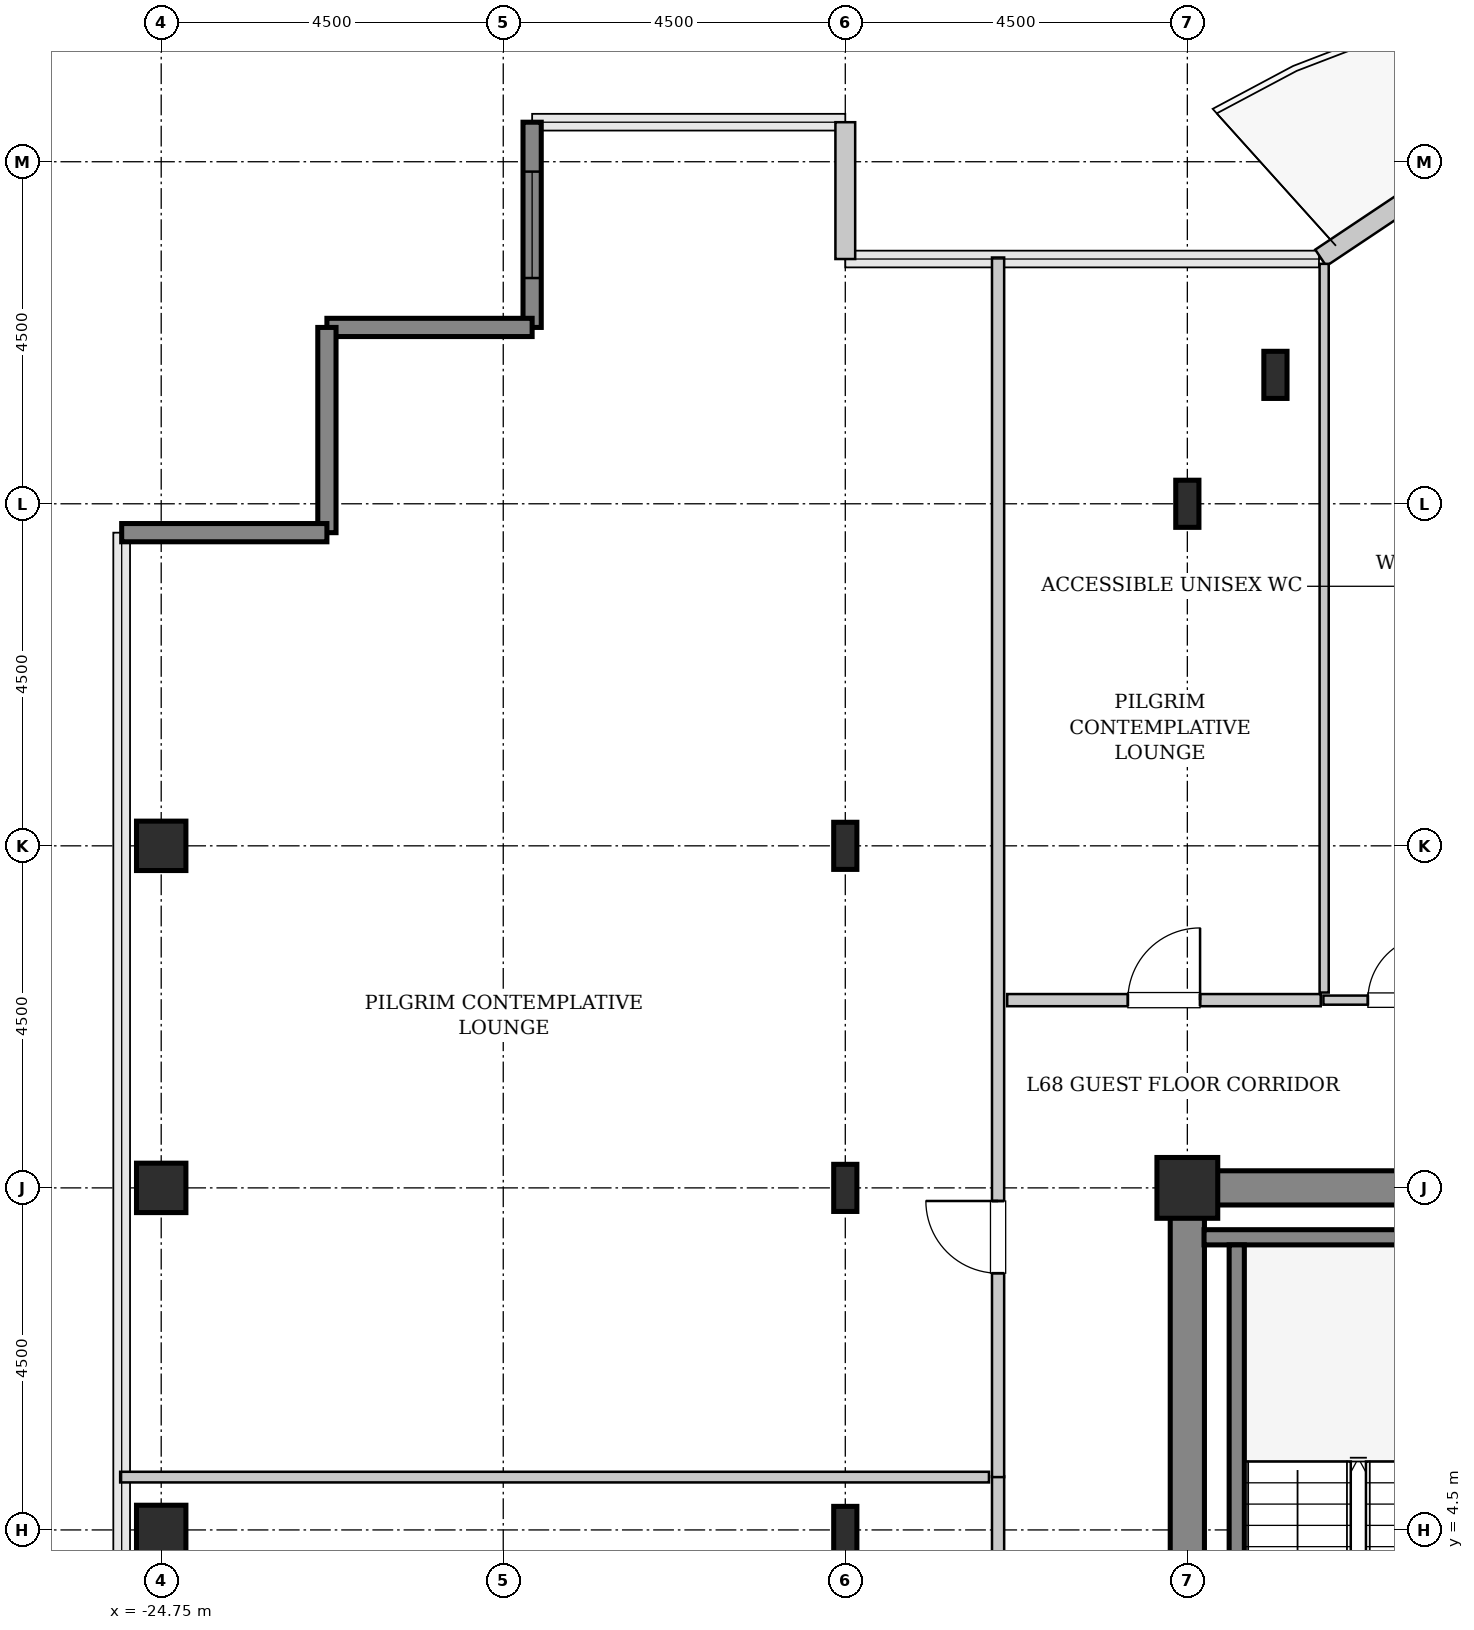
"""IFC4 building model, lengths in metres.
Left out: names, types, materials, properties, quantities, classifications, styles, units other than length and angle.
Written with IfcOpenShell. Run it as: python <this file> out.ifc"""

import sys

from ifc_helpers import new_model, si_unit, direction, frame, frame_2d, origin, origin_2d, place, context, subcontext, project, spatial, rectangle, hollow_rectangle, i_section, extrude, source, transform, mapped, element, fill, save


model = new_model("IFC4")
c1 = context("Model", 3, precision=1e-05, world=origin(), true_north=direction((0.0, 1.0)))
c2 = subcontext(c1, "Body", "Model", "MODEL_VIEW")
j1 = project(units=[si_unit("LENGTHUNIT", "METRE"), si_unit("PLANEANGLEUNIT", "RADIAN")], contexts=[c1])
p1 = place(None, origin())
s1 = spatial("IfcSite", under=j1, at=p1, CompositionType="ELEMENT")
p2 = place(p1, origin())
s2 = spatial("IfcBuilding", under=s1, at=p2, CompositionType="ELEMENT")
p3 = place(p2, frame((0.0, 0.0, 272.2)))
s3 = spatial("IfcBuildingStorey", under=s2, at=p3, CompositionType="ELEMENT", Elevation=272.2)
m1 = source(origin(), c2, "Body", "SweptSolid", [
    extrude(rectangle(XDim=9.925, YDim=0.45, at=frame_2d((4.962, 0.0))), origin(), (0.0, 0.0, 1.0), 3.8),
])
p4 = place(p3, frame((-11.475, 9.0, 0.0), z_axis=(0.0, 0.0, 1.0), x_axis=(1.0, 0.0, 0.0)))
e1 = element("IfcWall", 1, at=p4, inside=s3, PredefinedType="SHEAR", context=c2, shape_type="MappedRepresentation", body=[
    mapped(m1, transform((0.0, 0.0, 0.0), x_axis=(1.0, 0.0, 0.0), y_axis=(0.0, 1.0, 0.0), z_axis=(0.0, 0.0, 1.0), scale=1.0)),
])
m2 = source(origin(), c2, "Body", "SweptSolid", [
    extrude(rectangle(XDim=7.425, YDim=0.45, at=frame_2d((3.712, 0.0))), origin(), (0.0, 0.0, 1.0), 3.8),
])
p5 = place(p3, frame((-11.25, 1.35, 0.0), z_axis=(0.0, 0.0, 1.0), x_axis=(0.0, 1.0, 0.0)))
e2 = element("IfcWall", 2, at=p5, inside=s3, PredefinedType="SHEAR", context=c2, shape_type="MappedRepresentation", body=[
    mapped(m2, transform((0.0, 0.0, 0.0), x_axis=(1.0, 0.0, 0.0), y_axis=(0.0, 1.0, 0.0), z_axis=(0.0, 0.0, 1.0), scale=1.0)),
])
m3 = source(origin(), c2, "Body", "SweptSolid", [
    extrude(hollow_rectangle(XDim=0.65, YDim=0.65, WallThickness=0.032, InnerFilletRadius=0.032, OuterFilletRadius=0.064, at=origin_2d()), origin(), (0.0, 0.0, 1.0), 3.8),
])
for number, where, z_axis, x_axis in (
    (3, (-24.75, 4.5, 0.0), (0.0, 0.0, 1.0), (1.0, 0.0, 0.0)),
    (4, (-24.75, 9.0, 0.0), (0.0, 0.0, 1.0), (1.0, 0.0, 0.0)),
    (5, (-24.75, 13.5, 0.0), (0.0, 0.0, 1.0), (1.0, 0.0, 0.0)),
):
    element("IfcColumn", number, at=place(p3, frame(where, z_axis=z_axis, x_axis=x_axis)), inside=s3, PredefinedType="COLUMN", context=c2, shape_type="MappedRepresentation", body=[
        mapped(m3, transform((0.0, 0.0, 0.0), x_axis=(1.0, 0.0, 0.0), y_axis=(0.0, 1.0, 0.0), z_axis=(0.0, 0.0, 1.0), scale=1.0)),
    ])
m4 = source(origin(), c2, "Body", "SweptSolid", [
    extrude(i_section(OverallWidth=0.305, OverallDepth=0.62, WebThickness=0.021, FlangeThickness=0.04, FilletRadius=0.027, at=origin_2d()), origin(), (0.0, 0.0, 1.0), 3.8),
])
for number, where, z_axis, x_axis in (
    (6, (-15.75, 4.5, 0.0), (0.0, 0.0, 1.0), (1.0, 0.0, 0.0)),
    (7, (-15.75, 9.0, 0.0), (0.0, 0.0, 1.0), (1.0, 0.0, 0.0)),
    (8, (-15.75, 13.5, 0.0), (0.0, 0.0, 1.0), (1.0, 0.0, 0.0)),
):
    element("IfcColumn", number, at=place(p3, frame(where, z_axis=z_axis, x_axis=x_axis)), inside=s3, PredefinedType="COLUMN", context=c2, shape_type="MappedRepresentation", body=[
        mapped(m4, transform((0.0, 0.0, 0.0), x_axis=(1.0, 0.0, 0.0), y_axis=(0.0, 1.0, 0.0), z_axis=(0.0, 0.0, 1.0), scale=1.0)),
    ])
m5 = source(origin(), c2, "Body", "SweptSolid", [
    extrude(hollow_rectangle(XDim=0.8, YDim=0.8, WallThickness=0.04, InnerFilletRadius=0.04, OuterFilletRadius=0.08, at=origin_2d()), origin(), (0.0, 0.0, 1.0), 3.8),
])
p6 = place(p3, frame((-11.25, 9.0, 0.0), z_axis=(0.0, 0.0, 1.0), x_axis=(1.0, 0.0, 0.0)))
e9 = element("IfcColumn", 9, at=p6, inside=s3, PredefinedType="COLUMN", context=c2, shape_type="MappedRepresentation", body=[
    mapped(m5, transform((0.0, 0.0, 0.0), x_axis=(1.0, 0.0, 0.0), y_axis=(0.0, 1.0, 0.0), z_axis=(0.0, 0.0, 1.0), scale=1.0)),
])
for number, where, z_axis, x_axis in (
    (10, (-11.25, 18.0, 0.0), (0.0, 0.0, 1.0), (1.0, 0.0, 0.0)),
    (11, (-10.091, 19.696, 0.0), (0.0, 0.0, 1.0), (1.0, 0.0, 0.0)),
):
    element("IfcColumn", number, at=place(p3, frame(where, z_axis=z_axis, x_axis=x_axis)), inside=s3, PredefinedType="COLUMN", context=c2, shape_type="MappedRepresentation", body=[
        mapped(m4, transform((0.0, 0.0, 0.0), x_axis=(1.0, 0.0, 0.0), y_axis=(0.0, 1.0, 0.0), z_axis=(0.0, 0.0, 1.0), scale=1.0)),
    ])
m6 = source(origin(), c2, "Body", "SweptSolid", [
    extrude(rectangle(XDim=1.469, YDim=0.26, at=frame_2d((0.734, 0.0))), origin(), (0.0, 0.0, 1.0), 3.55),
])
p7 = place(p3, frame((-8.273, 22.052, 0.0), z_axis=(0.0, 0.0, 1.0), x_axis=(-0.831461760506, -0.555581983884, 0.0)))
e12 = element("IfcWall", 12, at=p7, inside=s3, PredefinedType="SOLIDWALL", context=c2, shape_type="MappedRepresentation", body=[
    mapped(m6, transform((0.0, 0.0, 0.0), x_axis=(1.0, 0.0, 0.0), y_axis=(0.0, 1.0, 0.0), z_axis=(0.0, 0.0, 1.0), scale=1.0)),
])
m7 = source(origin(), c2, "Body", "SweptSolid", [
    extrude(rectangle(XDim=1.8, YDim=0.26, at=frame_2d((0.9, 0.0))), origin(), (0.0, 0.0, 1.0), 3.55),
])
p8 = place(p3, frame((-15.75, 21.22, 0.0), z_axis=(0.0, 0.0, 1.0), x_axis=(0.0, 1.0, 0.0)))
e13 = element("IfcWall", 13, at=p8, inside=s3, PredefinedType="SOLIDWALL", context=c2, shape_type="MappedRepresentation", body=[
    mapped(m7, transform((0.0, 0.0, 0.0), x_axis=(1.0, 0.0, 0.0), y_axis=(0.0, 1.0, 0.0), z_axis=(0.0, 0.0, 1.0), scale=1.0)),
])
m8 = source(origin(), c2, "Body", "SweptSolid", [
    extrude(rectangle(XDim=2.7, YDim=0.24, at=frame_2d((1.35, 0.0))), origin(), (0.0, 0.0, 1.0), 3.55),
])
p9 = place(p3, frame((-19.87, 23.02, 0.0), z_axis=(0.0, 0.0, 1.0), x_axis=(0.0, -1.0, 0.0)))
e14 = element("IfcWall", 14, at=p9, inside=s3, PredefinedType="SHEAR", context=c2, shape_type="MappedRepresentation", body=[
    mapped(m8, transform((0.0, 0.0, 0.0), x_axis=(1.0, 0.0, 0.0), y_axis=(0.0, 1.0, 0.0), z_axis=(0.0, 0.0, 1.0), scale=1.0)),
])
p10 = place(p9, frame((0.65, 0.0, 0.85)))
e15 = element("IfcOpeningElement", 15, at=p10, cuts=e14, PredefinedType="OPENING", context=c2, shape_type="SweptSolid", body=[
    extrude(rectangle(XDim=1.4, YDim=1.8, at=frame_2d((0.7, 0.9))), frame((0.0, 0.13, 0.0), z_axis=(0.0, -1.0, 0.0), x_axis=(1.0, 0.0, 0.0)), (0.0, 0.0, 1.0), 0.26),
])
for number, where, z_axis, x_axis in (
    (16, (-19.87, 20.32, 0.0), (0.0, 0.0, 1.0), (-1.0, 0.0, 0.0)),
    (17, (-22.57, 20.32, 0.0), (0.0, 0.0, 1.0), (0.0, -1.0, 0.0)),
    (18, (-22.57, 17.62, 0.0), (0.0, 0.0, 1.0), (-1.0, 0.0, 0.0)),
):
    element("IfcWall", number, at=place(p3, frame(where, z_axis=z_axis, x_axis=x_axis)), inside=s3, PredefinedType="SHEAR", context=c2, shape_type="MappedRepresentation", body=[
        mapped(m8, transform((0.0, 0.0, 0.0), x_axis=(1.0, 0.0, 0.0), y_axis=(0.0, 1.0, 0.0), z_axis=(0.0, 0.0, 1.0), scale=1.0)),
    ])
m9 = source(origin(), c2, "Body", "SweptSolid", [
    extrude(rectangle(XDim=3.73, YDim=0.2, at=frame_2d((1.865, 0.0))), origin(), (0.0, 0.0, 1.0), 3.8),
])
p11 = place(p3, frame((-7.3, 8.35, 0.0), z_axis=(0.0, 0.0, 1.0), x_axis=(-1.0, 0.0, 0.0)))
e19 = element("IfcWall", 19, at=p11, inside=s3, PredefinedType="SOLIDWALL", context=c2, shape_type="MappedRepresentation", body=[
    mapped(m9, transform((0.0, 0.0, 0.0), x_axis=(1.0, 0.0, 0.0), y_axis=(0.0, 1.0, 0.0), z_axis=(0.0, 0.0, 1.0), scale=1.0)),
])
m10 = source(origin(), c2, "Body", "SweptSolid", [
    extrude(rectangle(XDim=7.1, YDim=0.2, at=frame_2d((3.55, 0.0))), origin(), (0.0, 0.0, 1.0), 3.8),
])
p12 = place(p3, frame((-10.6, 1.15, 0.0), z_axis=(0.0, 0.0, 1.0), x_axis=(0.0, 1.0, 0.0)))
e20 = element("IfcWall", 20, at=p12, inside=s3, PredefinedType="SOLIDWALL", context=c2, shape_type="MappedRepresentation", body=[
    mapped(m10, transform((0.0, 0.0, 0.0), x_axis=(1.0, 0.0, 0.0), y_axis=(0.0, 1.0, 0.0), z_axis=(0.0, 0.0, 1.0), scale=1.0)),
])
m11 = source(origin(), c2, "Body", "SweptSolid", [
    extrude(rectangle(XDim=2.02, YDim=0.12, at=frame_2d((1.01, 0.0))), origin(), (0.0, 0.0, 1.0), 3.535),
])
p13 = place(p3, frame((-9.46, 11.47, 0.0), z_axis=(0.0, 0.0, 1.0), x_axis=(1.0, 0.0, 0.0)))
e21 = element("IfcWall", 21, at=p13, inside=s3, PredefinedType="PLUMBINGWALL", context=c2, shape_type="MappedRepresentation", body=[
    mapped(m11, transform((0.0, 0.0, 0.0), x_axis=(1.0, 0.0, 0.0), y_axis=(0.0, 1.0, 0.0), z_axis=(0.0, 0.0, 1.0), scale=1.0)),
])
p14 = place(p13, frame((0.585, 0.0, 0.0)))
e22 = element("IfcOpeningElement", 22, at=p14, cuts=e21, PredefinedType="OPENING", context=c2, shape_type="SweptSolid", body=[
    extrude(rectangle(XDim=0.85, YDim=2.1, at=frame_2d((0.425, 1.05))), frame((0.0, 0.07, 0.0), z_axis=(0.0, -1.0, 0.0), x_axis=(1.0, 0.0, 0.0)), (0.0, 0.0, 1.0), 0.14),
])
m12 = source(origin(), c2, "Body", "SweptSolid", [
    extrude(rectangle(XDim=9.587, YDim=0.12, at=frame_2d((4.793, 0.0))), origin(), (0.0, 0.0, 1.0), 3.535),
])
p15 = place(p3, frame((-9.45, 11.57, 0.0), z_axis=(0.0, 0.0, 1.0), x_axis=(0.0, 1.0, 0.0)))
e23 = element("IfcWall", 23, at=p15, inside=s3, PredefinedType="PLUMBINGWALL", context=c2, shape_type="MappedRepresentation", body=[
    mapped(m12, transform((0.0, 0.0, 0.0), x_axis=(1.0, 0.0, 0.0), y_axis=(0.0, 1.0, 0.0), z_axis=(0.0, 0.0, 1.0), scale=1.0)),
])
m13 = source(origin(), c2, "Body", "SweptSolid", [
    extrude(rectangle(XDim=6.705, YDim=0.16, at=frame_2d((3.353, 0.0))), origin(), (0.0, 0.0, 1.0), 3.535),
])
p16 = place(p3, frame((-13.74, -1.5, 0.0), z_axis=(0.0, 0.0, 1.0), x_axis=(0.0, 1.0, 0.0)))
e24 = element("IfcWall", 24, at=p16, inside=s3, PredefinedType="PARTITIONING", context=c2, shape_type="MappedRepresentation", body=[
    mapped(m13, transform((0.0, 0.0, 0.0), x_axis=(1.0, 0.0, 0.0), y_axis=(0.0, 1.0, 0.0), z_axis=(0.0, 0.0, 1.0), scale=1.0)),
])
p17 = place(p16, frame((2.877, 0.0, 0.0)))
e25 = element("IfcOpeningElement", 25, at=p17, cuts=e24, PredefinedType="OPENING", context=c2, shape_type="SweptSolid", body=[
    extrude(rectangle(XDim=0.95, YDim=2.1, at=frame_2d((0.475, 1.05))), frame((0.0, 0.09, 0.0), z_axis=(0.0, -1.0, 0.0), x_axis=(1.0, 0.0, 0.0)), (0.0, 0.0, 1.0), 0.18),
])
m14 = source(origin(), c2, "Body", "SweptSolid", [
    extrude(rectangle(XDim=11.43, YDim=0.14, at=frame_2d((5.715, 0.0))), origin(), (0.0, 0.0, 1.0), 3.535),
])
p18 = place(p3, frame((-25.29, 5.195, 0.0), z_axis=(0.0, 0.0, 1.0), x_axis=(1.0, 0.0, 0.0)))
e26 = element("IfcWall", 26, at=p18, inside=s3, PredefinedType="PARTITIONING", context=c2, shape_type="MappedRepresentation", body=[
    mapped(m14, transform((0.0, 0.0, 0.0), x_axis=(1.0, 0.0, 0.0), y_axis=(0.0, 1.0, 0.0), z_axis=(0.0, 0.0, 1.0), scale=1.0)),
])
m15 = source(origin(), c2, "Body", "SweptSolid", [
    extrude(rectangle(XDim=16.045, YDim=0.16, at=frame_2d((8.022, 0.0))), origin(), (0.0, 0.0, 1.0), 3.535),
])
p19 = place(p3, frame((-13.74, 5.195, 0.0), z_axis=(0.0, 0.0, 1.0), x_axis=(0.0, 1.0, 0.0)))
e27 = element("IfcWall", 27, at=p19, inside=s3, PredefinedType="PARTITIONING", context=c2, shape_type="MappedRepresentation", body=[
    mapped(m15, transform((0.0, 0.0, 0.0), x_axis=(1.0, 0.0, 0.0), y_axis=(0.0, 1.0, 0.0), z_axis=(0.0, 0.0, 1.0), scale=1.0)),
])
p20 = place(p19, frame((2.683, 0.0, 0.0)))
e28 = element("IfcOpeningElement", 28, at=p20, cuts=e27, PredefinedType="OPENING", context=c2, shape_type="SweptSolid", body=[
    extrude(rectangle(XDim=0.95, YDim=2.1, at=frame_2d((0.475, 1.05))), frame((0.0, 0.09, 0.0), z_axis=(0.0, -1.0, 0.0), x_axis=(1.0, 0.0, 0.0)), (0.0, 0.0, 1.0), 0.18),
])
m16 = source(origin(), c2, "Body", "SweptSolid", [
    extrude(rectangle(XDim=4.125, YDim=0.16, at=frame_2d((2.062, 0.0))), origin(), (0.0, 0.0, 1.0), 3.535),
])
p21 = place(p3, frame((-13.62, 11.47, 0.0), z_axis=(0.0, 0.0, 1.0), x_axis=(1.0, 0.0, 0.0)))
e29 = element("IfcWall", 29, at=p21, inside=s3, PredefinedType="PARTITIONING", context=c2, shape_type="MappedRepresentation", body=[
    mapped(m16, transform((0.0, 0.0, 0.0), x_axis=(1.0, 0.0, 0.0), y_axis=(0.0, 1.0, 0.0), z_axis=(0.0, 0.0, 1.0), scale=1.0)),
])
p22 = place(p21, frame((1.587, 0.0, 0.0)))
e30 = element("IfcOpeningElement", 30, at=p22, cuts=e29, PredefinedType="OPENING", context=c2, shape_type="SweptSolid", body=[
    extrude(rectangle(XDim=0.95, YDim=2.1, at=frame_2d((0.475, 1.05))), frame((0.0, 0.09, 0.0), z_axis=(0.0, -1.0, 0.0), x_axis=(1.0, 0.0, 0.0)), (0.0, 0.0, 1.0), 0.18),
])
m17 = source(origin(), c2, "Body", "SweptSolid", [
    extrude(rectangle(XDim=1.4, YDim=1.8, at=frame_2d((0.7, 0.9))), frame((0.0, 0.03, 0.0), z_axis=(0.0, -1.0, 0.0), x_axis=(1.0, 0.0, 0.0)), (0.0, 0.0, 1.0), 0.06),
])
p23 = place(p10, origin())
e31 = element("IfcWindow", 31, at=p23, inside=s3, PartitioningType="SINGLE_PANEL", PredefinedType="WINDOW", context=c2, shape_type="MappedRepresentation", body=[
    mapped(m17, transform((0.0, 0.0, 0.0), x_axis=(1.0, 0.0, 0.0), y_axis=(0.0, 1.0, 0.0), z_axis=(0.0, 0.0, 1.0), scale=1.0)),
])
fill(e15, e31)
m18 = source(origin(), c2, "Body", "SweptSolid", [
    extrude(rectangle(XDim=0.85, YDim=2.1, at=frame_2d((0.425, 1.05))), frame((0.0, 0.025, 0.0), z_axis=(0.0, -1.0, 0.0), x_axis=(1.0, 0.0, 0.0)), (0.0, 0.0, 1.0), 0.05),
])
p24 = place(p14, origin())
e32 = element("IfcDoor", 32, at=p24, inside=s3, OperationType="SINGLE_SWING_RIGHT", PredefinedType="DOOR", context=c2, shape_type="MappedRepresentation", body=[
    mapped(m18, transform((0.0, 0.0, 0.0), x_axis=(1.0, 0.0, 0.0), y_axis=(0.0, 1.0, 0.0), z_axis=(0.0, 0.0, 1.0), scale=1.0)),
])
fill(e22, e32)
m19 = source(origin(), c2, "Body", "SweptSolid", [
    extrude(rectangle(XDim=0.95, YDim=2.1, at=frame_2d((0.475, 1.05))), frame((0.0, 0.025, 0.0), z_axis=(0.0, -1.0, 0.0), x_axis=(1.0, 0.0, 0.0)), (0.0, 0.0, 1.0), 0.05),
])
p25 = place(p20, origin())
e33 = element("IfcDoor", 33, at=p25, inside=s3, OperationType="SINGLE_SWING_RIGHT", PredefinedType="DOOR", context=c2, shape_type="MappedRepresentation", body=[
    mapped(m19, transform((0.0, 0.0, 0.0), x_axis=(1.0, 0.0, 0.0), y_axis=(0.0, 1.0, 0.0), z_axis=(0.0, 0.0, 1.0), scale=1.0)),
])
fill(e28, e33)
p26 = place(p22, origin())
e34 = element("IfcDoor", 34, at=p26, inside=s3, OperationType="SINGLE_SWING_RIGHT", PredefinedType="DOOR", context=c2, shape_type="MappedRepresentation", body=[
    mapped(m19, transform((0.0, 0.0, 0.0), x_axis=(1.0, 0.0, 0.0), y_axis=(0.0, 1.0, 0.0), z_axis=(0.0, 0.0, 1.0), scale=1.0)),
])
fill(e30, e34)
save(model, sys.argv[1])
